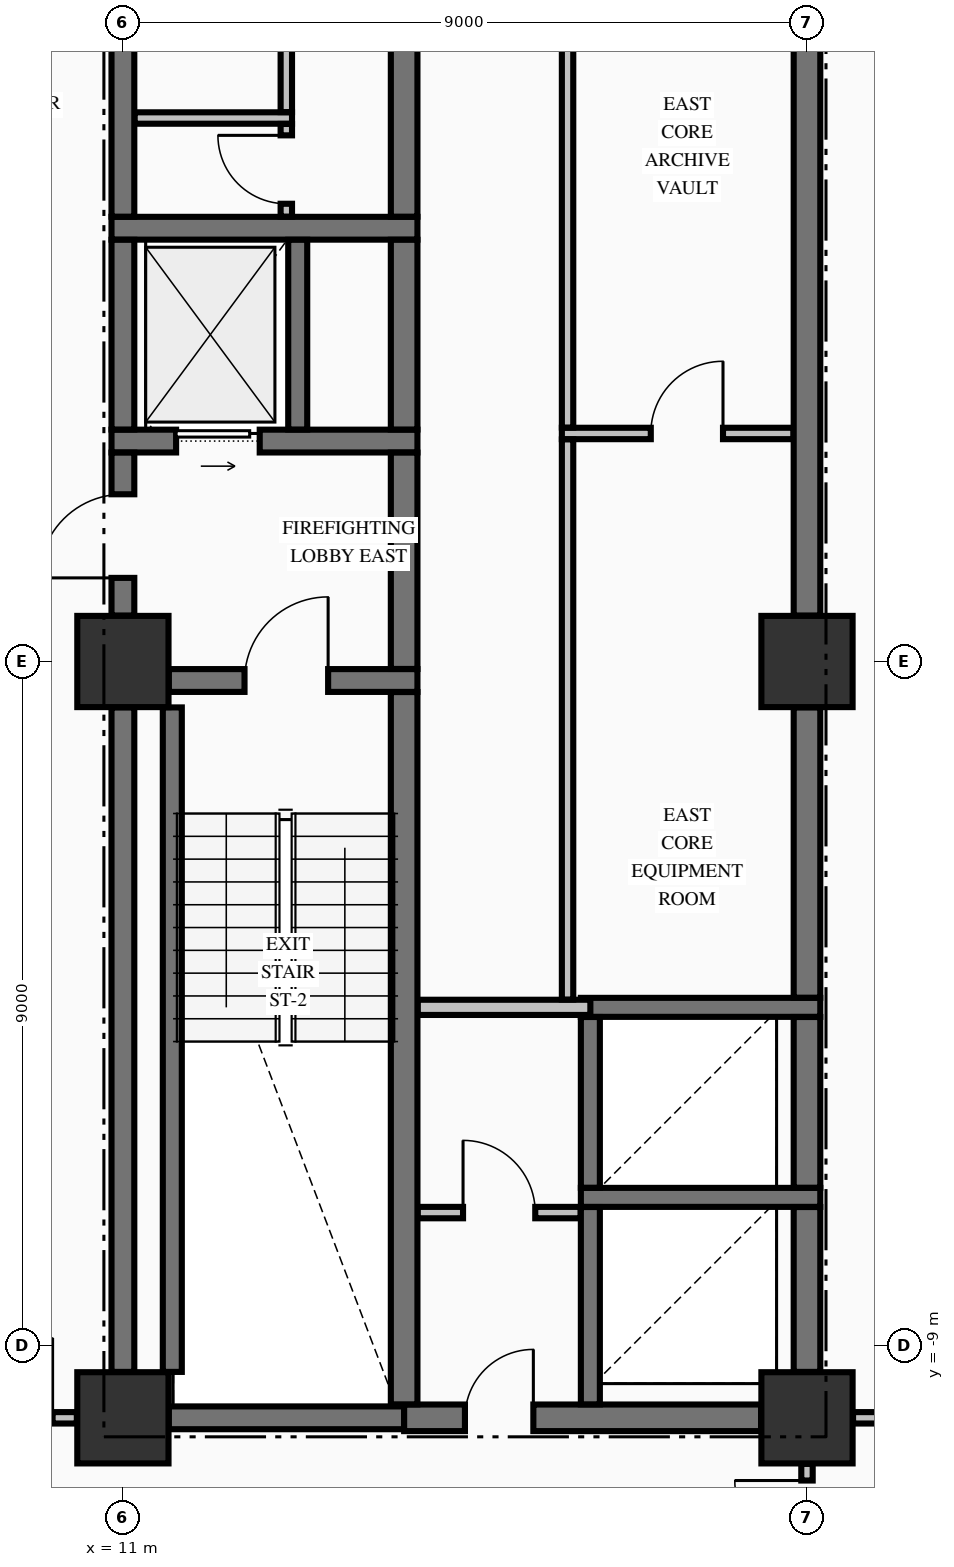
"""IFC4 building model, lengths in metres.
Left out: names, types, materials, properties, quantities, classifications, styles, units other than length and angle.
Written with IfcOpenShell. Run it as: python <this file> out.ifc"""

import sys

from ifc_helpers import new_model, si_unit, direction, frame, frame_2d, origin, origin_2d, place, context, subcontext, project, spatial, rectangle, extrude, element, fill, save


model = new_model("IFC4")
c1 = context("Model", 3, precision=1e-05, world=origin(), true_north=direction((0.0, 1.0)))
c2 = subcontext(c1, "Body", "Model", "MODEL_VIEW")
j1 = project(units=[si_unit("LENGTHUNIT", "METRE"), si_unit("PLANEANGLEUNIT", "RADIAN")], contexts=[c1])
p1 = place(None, origin())
s1 = spatial("IfcSite", under=j1, at=p1, CompositionType="ELEMENT")
p2 = place(p1, origin())
s2 = spatial("IfcBuilding", under=s1, at=p2, CompositionType="ELEMENT")
p3 = place(p2, frame((0.0, 0.0, 71.47)))
s3 = spatial("IfcBuildingStorey", under=s2, at=p3, CompositionType="ELEMENT", Elevation=71.47)
for number, where, z_axis, x_axis in (
    (1, (11.0, -9.95, -0.325), (0.0, 0.0, 1.0), (1.0, 0.0, 0.0)),
    (2, (11.0, 0.0, -0.325), (0.0, 0.0, 1.0), (1.0, 0.0, 0.0)),
    (3, (20.0, -9.95, -0.325), (0.0, 0.0, 1.0), (1.0, 0.0, 0.0)),
    (4, (20.0, 0.0, -0.325), (0.0, 0.0, 1.0), (1.0, 0.0, 0.0)),
):
    element("IfcColumn", number, at=place(p3, frame(where, z_axis=z_axis, x_axis=x_axis)), inside=s3, PredefinedType="COLUMN", context=c2, shape_type="SweptSolid", body=[
        extrude(rectangle(XDim=1.2, YDim=1.2, at=origin_2d()), origin(), (0.0, 0.0, 1.0), 3.645),
    ])
p4 = place(p3, frame((11.604, -9.95, 0.0), z_axis=(0.0, 0.0, 1.0), x_axis=(1.0, 0.0, 0.0)))
e5 = element("IfcWall", 5, at=p4, inside=s3, PredefinedType="SHEAR", context=c2, shape_type="SweptSolid", body=[
    extrude(rectangle(XDim=3.096, YDim=0.3, at=frame_2d((1.548, 0.0))), origin(), (0.0, 0.0, 1.0), 3.32),
])
p5 = place(p3, frame((14.7, -9.95, 0.0), z_axis=(0.0, 0.0, 1.0), x_axis=(1.0, 0.0, 0.0)))
e6 = element("IfcWall", 6, at=p5, inside=s3, PredefinedType="SHEAR", context=c2, shape_type="SweptSolid", body=[
    extrude(rectangle(XDim=4.696, YDim=0.35, at=frame_2d((2.348, 0.0))), origin(), (0.0, 0.0, 1.0), 3.32),
])
p6 = place(p5, frame((0.8, 0.0, 0.0)))
e7 = element("IfcOpeningElement", 7, at=p6, cuts=e6, PredefinedType="OPENING", context=c2, shape_type="SweptSolid", body=[
    extrude(rectangle(XDim=0.9, YDim=2.15, at=frame_2d((0.45, 1.075))), frame((0.0, 0.185, 0.0), z_axis=(0.0, -1.0, 0.0), x_axis=(1.0, 0.0, 0.0)), (0.0, 0.0, 1.0), 0.37),
])
for number, where, z_axis, x_axis in (
    (8, (17.025, -7.05, 0.0), (0.0, 0.0, 1.0), (1.0, 0.0, 0.0)),
    (9, (17.025, -4.55, 0.0), (0.0, 0.0, 1.0), (1.0, 0.0, 0.0)),
):
    element("IfcWall", number, at=place(p3, frame(where, z_axis=z_axis, x_axis=x_axis)), inside=s3, PredefinedType="SOLIDWALL", context=c2, shape_type="SweptSolid", body=[
        extrude(rectangle(XDim=3.15, YDim=0.25, at=frame_2d((1.575, 0.0))), origin(), (0.0, 0.0, 1.0), 3.32),
    ])
p7 = place(p3, frame((11.604, -0.25, 0.0), z_axis=(0.0, 0.0, 1.0), x_axis=(1.0, 0.0, 0.0)))
e10 = element("IfcWall", 10, at=p7, inside=s3, PredefinedType="SHEAR", context=c2, shape_type="SweptSolid", body=[
    extrude(rectangle(XDim=3.271, YDim=0.3, at=frame_2d((1.635, 0.0))), origin(), (0.0, 0.0, 1.0), 3.32),
])
p8 = place(p7, frame((0.996, 0.0, 0.0)))
e11 = element("IfcOpeningElement", 11, at=p8, cuts=e10, PredefinedType="OPENING", context=c2, shape_type="SweptSolid", body=[
    extrude(rectangle(XDim=1.1, YDim=2.15, at=frame_2d((0.55, 1.075))), frame((0.0, 0.16, 0.0), z_axis=(0.0, -1.0, 0.0), x_axis=(1.0, 0.0, 0.0)), (0.0, 0.0, 1.0), 0.32),
])
p9 = place(p3, frame((10.85, 2.9, 0.0), z_axis=(0.0, 0.0, 1.0), x_axis=(1.0, 0.0, 0.0)))
e12 = element("IfcWall", 12, at=p9, inside=s3, PredefinedType="SHEAR", context=c2, shape_type="SweptSolid", body=[
    extrude(rectangle(XDim=4.025, YDim=0.3, at=frame_2d((2.012, 0.0))), origin(), (0.0, 0.0, 1.0), 3.32),
])
p10 = place(p9, frame((0.85, 0.0, 0.0)))
e13 = element("IfcOpeningElement", 13, at=p10, cuts=e12, PredefinedType="OPENING", context=c2, shape_type="SweptSolid", body=[
    extrude(rectangle(XDim=1.1, YDim=2.2, at=frame_2d((0.55, 1.1))), frame((0.0, 0.16, 0.0), z_axis=(0.0, -1.0, 0.0), x_axis=(1.0, 0.0, 0.0)), (0.0, 0.0, 1.0), 0.32),
])
p11 = place(p3, frame((10.85, 5.7, 0.0), z_axis=(0.0, 0.0, 1.0), x_axis=(1.0, 0.0, 0.0)))
e14 = element("IfcWall", 14, at=p11, inside=s3, PredefinedType="SHEAR", context=c2, shape_type="SweptSolid", body=[
    extrude(rectangle(XDim=4.025, YDim=0.3, at=frame_2d((2.012, 0.0))), origin(), (0.0, 0.0, 1.0), 3.32),
])
p12 = place(p3, frame((-10.394, -9.95, 0.0), z_axis=(0.0, 0.0, 1.0), x_axis=(1.0, 0.0, 0.0)))
e15 = element("IfcWall", 15, at=p12, inside=s3, PredefinedType="PARTITIONING", context=c2, shape_type="SweptSolid", body=[
    extrude(rectangle(XDim=20.788, YDim=0.15, at=frame_2d((10.394, 0.0))), origin(), (0.0, 0.0, 1.0), 3.32),
])
p13 = place(p12, frame((0.319, 0.0, 0.0)))
e16 = element("IfcOpeningElement", 16, at=p13, cuts=e15, PredefinedType="OPENING", context=c2, shape_type="SweptSolid", body=[
    extrude(rectangle(XDim=1.05, YDim=2.15, at=frame_2d((0.525, 1.075))), frame((0.0, 0.085, 0.0), z_axis=(0.0, -1.0, 0.0), x_axis=(1.0, 0.0, 0.0)), (0.0, 0.0, 1.0), 0.17),
])
p14 = place(p12, frame((19.419, 0.0, 0.0)))
e17 = element("IfcOpeningElement", 17, at=p14, cuts=e15, PredefinedType="OPENING", context=c2, shape_type="SweptSolid", body=[
    extrude(rectangle(XDim=1.05, YDim=2.15, at=frame_2d((0.525, 1.075))), frame((0.0, 0.085, 0.0), z_axis=(0.0, -1.0, 0.0), x_axis=(1.0, 0.0, 0.0)), (0.0, 0.0, 1.0), 0.17),
])
p15 = place(p12, frame((11.569, 0.0, 0.0)))
e18 = element("IfcOpeningElement", 18, at=p15, cuts=e15, PredefinedType="OPENING", context=c2, shape_type="SweptSolid", body=[
    extrude(rectangle(XDim=0.95, YDim=2.15, at=frame_2d((0.475, 1.075))), frame((0.0, 0.085, 0.0), z_axis=(0.0, -1.0, 0.0), x_axis=(1.0, 0.0, 0.0)), (0.0, 0.0, 1.0), 0.17),
])
p16 = place(p3, frame((20.606, -9.95, 0.0), z_axis=(0.0, 0.0, 1.0), x_axis=(1.0, 0.0, 0.0)))
e19 = element("IfcWall", 19, at=p16, inside=s3, PredefinedType="PARTITIONING", context=c2, shape_type="SweptSolid", body=[
    extrude(rectangle(XDim=3.229, YDim=0.15, at=frame_2d((1.615, 0.0))), origin(), (0.0, 0.0, 1.0), 3.32),
])
p17 = place(p16, frame((0.894, 0.0, 0.0)))
e20 = element("IfcOpeningElement", 20, at=p17, cuts=e19, PredefinedType="OPENING", context=c2, shape_type="SweptSolid", body=[
    extrude(rectangle(XDim=1.0, YDim=2.15, at=frame_2d((0.5, 1.075))), frame((0.0, 0.085, 0.0), z_axis=(0.0, -1.0, 0.0), x_axis=(1.0, 0.0, 0.0)), (0.0, 0.0, 1.0), 0.17),
])
p18 = place(p3, frame((14.878, -7.25, 0.0), z_axis=(0.0, 0.0, 1.0), x_axis=(1.0, 0.0, 0.0)))
e21 = element("IfcWall", 21, at=p18, inside=s3, PredefinedType="PARTITIONING", context=c2, shape_type="SweptSolid", body=[
    extrude(rectangle(XDim=2.144, YDim=0.15, at=frame_2d((1.072, 0.0))), origin(), (0.0, 0.0, 1.0), 3.32),
])
p19 = place(p18, frame((0.597, 0.0, 0.0)))
e22 = element("IfcOpeningElement", 22, at=p19, cuts=e21, PredefinedType="OPENING", context=c2, shape_type="SweptSolid", body=[
    extrude(rectangle(XDim=0.95, YDim=2.15, at=frame_2d((0.475, 1.075))), frame((0.0, 0.085, 0.0), z_axis=(0.0, -1.0, 0.0), x_axis=(1.0, 0.0, 0.0)), (0.0, 0.0, 1.0), 0.17),
])
p20 = place(p3, frame((14.878, -4.55, 0.0), z_axis=(0.0, 0.0, 1.0), x_axis=(1.0, 0.0, 0.0)))
e23 = element("IfcWall", 23, at=p20, inside=s3, PredefinedType="PARTITIONING", context=c2, shape_type="SweptSolid", body=[
    extrude(rectangle(XDim=2.272, YDim=0.2, at=frame_2d((1.136, 0.0))), origin(), (0.0, 0.0, 1.0), 3.32),
])
p21 = place(p3, frame((16.775, 3.0, 0.0), z_axis=(0.0, 0.0, 1.0), x_axis=(1.0, 0.0, 0.0)))
e24 = element("IfcWall", 24, at=p21, inside=s3, PredefinedType="PARTITIONING", context=c2, shape_type="SweptSolid", body=[
    extrude(rectangle(XDim=3.047, YDim=0.15, at=frame_2d((1.523, 0.0))), origin(), (0.0, 0.0, 1.0), 3.32),
])
p22 = place(p21, frame((1.17, 0.0, 0.0)))
e25 = element("IfcOpeningElement", 25, at=p22, cuts=e24, PredefinedType="OPENING", context=c2, shape_type="SweptSolid", body=[
    extrude(rectangle(XDim=0.95, YDim=2.15, at=frame_2d((0.475, 1.075))), frame((0.0, 0.085, 0.0), z_axis=(0.0, -1.0, 0.0), x_axis=(1.0, 0.0, 0.0)), (0.0, 0.0, 1.0), 0.17),
])
p23 = place(p3, frame((11.153, 7.15, 0.0), z_axis=(0.0, 0.0, 1.0), x_axis=(1.0, 0.0, 0.0)))
e26 = element("IfcWall", 26, at=p23, inside=s3, PredefinedType="PARTITIONING", context=c2, shape_type="SweptSolid", body=[
    extrude(rectangle(XDim=2.072, YDim=0.15, at=frame_2d((1.036, 0.0))), origin(), (0.0, 0.0, 1.0), 3.32),
])
p24 = place(p3, frame((11.0, -9.346, 0.0), z_axis=(0.0, 0.0, 1.0), x_axis=(0.0, 1.0, 0.0)))
e27 = element("IfcWall", 27, at=p24, inside=s3, PredefinedType="SHEAR", context=c2, shape_type="SweptSolid", body=[
    extrude(rectangle(XDim=8.742, YDim=0.3, at=frame_2d((4.371, 0.0))), origin(), (0.0, 0.0, 1.0), 3.32),
])
p25 = place(p3, frame((11.0, 0.604, 0.0), z_axis=(0.0, 0.0, 1.0), x_axis=(0.0, 1.0, 0.0)))
e28 = element("IfcWall", 28, at=p25, inside=s3, PredefinedType="SHEAR", context=c2, shape_type="SweptSolid", body=[
    extrude(rectangle(XDim=2.144, YDim=0.3, at=frame_2d((1.072, 0.0))), origin(), (0.0, 0.0, 1.0), 3.32),
])
p26 = place(p25, frame((0.496, 0.0, 0.0)))
e29 = element("IfcOpeningElement", 29, at=p26, cuts=e28, PredefinedType="OPENING", context=c2, shape_type="SweptSolid", body=[
    extrude(rectangle(XDim=1.1, YDim=2.15, at=frame_2d((0.55, 1.075))), frame((0.0, 0.16, 0.0), z_axis=(0.0, -1.0, 0.0), x_axis=(1.0, 0.0, 0.0)), (0.0, 0.0, 1.0), 0.32),
])
p27 = place(p3, frame((11.0, 3.052, 0.0), z_axis=(0.0, 0.0, 1.0), x_axis=(0.0, 1.0, 0.0)))
e30 = element("IfcWall", 30, at=p27, inside=s3, PredefinedType="SHEAR", context=c2, shape_type="SweptSolid", body=[
    extrude(rectangle(XDim=2.496, YDim=0.3, at=frame_2d((1.248, 0.0))), origin(), (0.0, 0.0, 1.0), 3.32),
])
p28 = place(p3, frame((11.0, 5.852, 0.0), z_axis=(0.0, 0.0, 1.0), x_axis=(0.0, 1.0, 0.0)))
e31 = element("IfcWall", 31, at=p28, inside=s3, PredefinedType="SHEAR", context=c2, shape_type="SweptSolid", body=[
    extrude(rectangle(XDim=4.044, YDim=0.3, at=frame_2d((2.022, 0.0))), origin(), (0.0, 0.0, 1.0), 3.32),
])
p29 = place(p3, frame((11.65, -9.346, 0.0), z_axis=(0.0, 0.0, 1.0), x_axis=(0.0, 1.0, 0.0)))
e32 = element("IfcWall", 32, at=p29, inside=s3, PredefinedType="SOLIDWALL", context=c2, shape_type="SweptSolid", body=[
    extrude(rectangle(XDim=8.742, YDim=0.25, at=frame_2d((4.371, 0.0))), origin(), (0.0, 0.0, 1.0), 3.32),
])
p30 = place(p3, frame((13.3, 3.052, 0.0), z_axis=(0.0, 0.0, 1.0), x_axis=(0.0, 1.0, 0.0)))
e33 = element("IfcWall", 33, at=p30, inside=s3, PredefinedType="SOLIDWALL", context=c2, shape_type="SweptSolid", body=[
    extrude(rectangle(XDim=2.496, YDim=0.25, at=frame_2d((1.248, 0.0))), origin(), (0.0, 0.0, 1.0), 3.32),
])
p31 = place(p3, frame((14.7, -9.773, 0.0), z_axis=(0.0, 0.0, 1.0), x_axis=(0.0, 1.0, 0.0)))
e34 = element("IfcWall", 34, at=p31, inside=s3, PredefinedType="SHEAR", context=c2, shape_type="SweptSolid", body=[
    extrude(rectangle(XDim=9.371, YDim=0.35, at=frame_2d((4.686, 0.0))), origin(), (0.0, 0.0, 1.0), 3.32),
])
p32 = place(p3, frame((14.7, -0.098, 0.0), z_axis=(0.0, 0.0, 1.0), x_axis=(0.0, 1.0, 0.0)))
e35 = element("IfcWall", 35, at=p32, inside=s3, PredefinedType="SHEAR", context=c2, shape_type="SweptSolid", body=[
    extrude(rectangle(XDim=2.846, YDim=0.35, at=frame_2d((1.423, 0.0))), origin(), (0.0, 0.0, 1.0), 3.32),
])
p33 = place(p3, frame((14.7, 3.052, 0.0), z_axis=(0.0, 0.0, 1.0), x_axis=(0.0, 1.0, 0.0)))
e36 = element("IfcWall", 36, at=p33, inside=s3, PredefinedType="SHEAR", context=c2, shape_type="SweptSolid", body=[
    extrude(rectangle(XDim=2.496, YDim=0.35, at=frame_2d((1.248, 0.0))), origin(), (0.0, 0.0, 1.0), 3.32),
])
p34 = place(p3, frame((14.7, 5.852, 0.0), z_axis=(0.0, 0.0, 1.0), x_axis=(0.0, 1.0, 0.0)))
e37 = element("IfcWall", 37, at=p34, inside=s3, PredefinedType="SHEAR", context=c2, shape_type="SweptSolid", body=[
    extrude(rectangle(XDim=4.471, YDim=0.35, at=frame_2d((2.235, 0.0))), origin(), (0.0, 0.0, 1.0), 3.32),
])
p35 = place(p3, frame((17.15, -9.773, 0.0), z_axis=(0.0, 0.0, 1.0), x_axis=(0.0, 1.0, 0.0)))
e38 = element("IfcWall", 38, at=p35, inside=s3, PredefinedType="SOLIDWALL", context=c2, shape_type="SweptSolid", body=[
    extrude(rectangle(XDim=2.596, YDim=0.25, at=frame_2d((1.298, 0.0))), origin(), (0.0, 0.0, 1.0), 3.32),
])
p36 = place(p3, frame((17.15, -6.923, 0.0), z_axis=(0.0, 0.0, 1.0), x_axis=(0.0, 1.0, 0.0)))
e39 = element("IfcWall", 39, at=p36, inside=s3, PredefinedType="SOLIDWALL", context=c2, shape_type="SweptSolid", body=[
    extrude(rectangle(XDim=2.246, YDim=0.25, at=frame_2d((1.123, 0.0))), origin(), (0.0, 0.0, 1.0), 3.32),
])
p37 = place(p3, frame((20.0, -9.346, 0.0), z_axis=(0.0, 0.0, 1.0), x_axis=(0.0, 1.0, 0.0)))
e40 = element("IfcWall", 40, at=p37, inside=s3, PredefinedType="SHEAR", context=c2, shape_type="SweptSolid", body=[
    extrude(rectangle(XDim=2.169, YDim=0.35, at=frame_2d((1.084, 0.0))), origin(), (0.0, 0.0, 1.0), 3.32),
])
p38 = place(p3, frame((20.0, -6.923, 0.0), z_axis=(0.0, 0.0, 1.0), x_axis=(0.0, 1.0, 0.0)))
e41 = element("IfcWall", 41, at=p38, inside=s3, PredefinedType="SHEAR", context=c2, shape_type="SweptSolid", body=[
    extrude(rectangle(XDim=2.246, YDim=0.35, at=frame_2d((1.123, 0.0))), origin(), (0.0, 0.0, 1.0), 3.32),
])
p39 = place(p3, frame((20.0, -4.423, 0.0), z_axis=(0.0, 0.0, 1.0), x_axis=(0.0, 1.0, 0.0)))
e42 = element("IfcWall", 42, at=p39, inside=s3, PredefinedType="SHEAR", context=c2, shape_type="SweptSolid", body=[
    extrude(rectangle(XDim=3.819, YDim=0.35, at=frame_2d((1.91, 0.0))), origin(), (0.0, 0.0, 1.0), 3.32),
])
p40 = place(p3, frame((20.0, 0.604, 0.0), z_axis=(0.0, 0.0, 1.0), x_axis=(0.0, 1.0, 0.0)))
e43 = element("IfcWall", 43, at=p40, inside=s3, PredefinedType="SHEAR", context=c2, shape_type="SweptSolid", body=[
    extrude(rectangle(XDim=9.292, YDim=0.35, at=frame_2d((4.646, 0.0))), origin(), (0.0, 0.0, 1.0), 3.32),
])
p41 = place(p3, frame((13.15, 5.853, 0.0), z_axis=(0.0, 0.0, 1.0), x_axis=(0.0, 1.0, 0.0)))
e44 = element("IfcWall", 44, at=p41, inside=s3, PredefinedType="PARTITIONING", context=c2, shape_type="SweptSolid", body=[
    extrude(rectangle(XDim=1.219, YDim=0.15, at=frame_2d((0.609, 0.0))), origin(), (0.0, 0.0, 1.0), 3.32),
])
p42 = place(p41, frame((0.169, 0.0, 0.0)))
e45 = element("IfcOpeningElement", 45, at=p42, cuts=e44, PredefinedType="OPENING", context=c2, shape_type="SweptSolid", body=[
    extrude(rectangle(XDim=0.9, YDim=2.15, at=frame_2d((0.45, 1.075))), frame((0.0, 0.085, 0.0), z_axis=(0.0, -1.0, 0.0), x_axis=(1.0, 0.0, 0.0)), (0.0, 0.0, 1.0), 0.17),
])
p43 = place(p3, frame((13.15, 7.228, 0.0), z_axis=(0.0, 0.0, 1.0), x_axis=(0.0, 1.0, 0.0)))
e46 = element("IfcWall", 46, at=p43, inside=s3, PredefinedType="PARTITIONING", context=c2, shape_type="SweptSolid", body=[
    extrude(rectangle(XDim=3.119, YDim=0.15, at=frame_2d((1.56, 0.0))), origin(), (0.0, 0.0, 1.0), 3.32),
])
p44 = place(p43, frame((1.097, 0.0, 0.0)))
e47 = element("IfcOpeningElement", 47, at=p44, cuts=e46, PredefinedType="OPENING", context=c2, shape_type="SweptSolid", body=[
    extrude(rectangle(XDim=0.95, YDim=2.15, at=frame_2d((0.475, 1.075))), frame((0.0, 0.085, 0.0), z_axis=(0.0, -1.0, 0.0), x_axis=(1.0, 0.0, 0.0)), (0.0, 0.0, 1.0), 0.17),
])
p45 = place(p3, frame((16.85, -4.447, 0.0), z_axis=(0.0, 0.0, 1.0), x_axis=(0.0, 1.0, 0.0)))
e48 = element("IfcWall", 48, at=p45, inside=s3, PredefinedType="PARTITIONING", context=c2, shape_type="SweptSolid", body=[
    extrude(rectangle(XDim=7.369, YDim=0.15, at=frame_2d((3.685, 0.0))), origin(), (0.0, 0.0, 1.0), 3.32),
])
p46 = place(p3, frame((16.85, 3.078, 0.0), z_axis=(0.0, 0.0, 1.0), x_axis=(0.0, 1.0, 0.0)))
e49 = element("IfcWall", 49, at=p46, inside=s3, PredefinedType="PARTITIONING", context=c2, shape_type="SweptSolid", body=[
    extrude(rectangle(XDim=7.244, YDim=0.15, at=frame_2d((3.622, 0.0))), origin(), (0.0, 0.0, 1.0), 3.32),
])
p47 = place(p3, frame((20.0, -12.472, 0.0), z_axis=(0.0, 0.0, 1.0), x_axis=(0.0, 1.0, 0.0)))
e50 = element("IfcWall", 50, at=p47, inside=s3, PredefinedType="PARTITIONING", context=c2, shape_type="SweptSolid", body=[
    extrude(rectangle(XDim=1.916, YDim=0.15, at=frame_2d((0.958, 0.0))), origin(), (0.0, 0.0, 1.0), 3.32),
])
p48 = place(p47, frame((0.747, 0.0, 0.0)))
e51 = element("IfcOpeningElement", 51, at=p48, cuts=e50, PredefinedType="OPENING", context=c2, shape_type="SweptSolid", body=[
    extrude(rectangle(XDim=0.95, YDim=2.15, at=frame_2d((0.475, 1.075))), frame((0.0, 0.085, 0.0), z_axis=(0.0, -1.0, 0.0), x_axis=(1.0, 0.0, 0.0)), (0.0, 0.0, 1.0), 0.17),
])
p49 = place(p8, origin())
e52 = element("IfcDoor", 52, at=p49, inside=s3, OperationType="SINGLE_SWING_RIGHT", PredefinedType="DOOR", context=c2, shape_type="SweptSolid", body=[
    extrude(rectangle(XDim=1.1, YDim=2.15, at=frame_2d((0.55, 1.075))), frame((0.0, 0.025, 0.0), z_axis=(0.0, -1.0, 0.0), x_axis=(1.0, 0.0, 0.0)), (0.0, 0.0, 1.0), 0.05),
])
fill(e11, e52)
p50 = place(p26, origin())
e53 = element("IfcDoor", 53, at=p50, inside=s3, OperationType="SINGLE_SWING_LEFT", PredefinedType="DOOR", context=c2, shape_type="SweptSolid", body=[
    extrude(rectangle(XDim=1.1, YDim=2.15, at=frame_2d((0.55, 1.075))), frame((0.0, 0.025, 0.0), z_axis=(0.0, -1.0, 0.0), x_axis=(1.0, 0.0, 0.0)), (0.0, 0.0, 1.0), 0.05),
])
fill(e29, e53)
p51 = place(p10, origin())
e54 = element("IfcDoor", 54, at=p51, inside=s3, OperationType="SLIDING_TO_RIGHT", PredefinedType="DOOR", context=c2, shape_type="SweptSolid", body=[
    extrude(rectangle(XDim=1.1, YDim=2.2, at=frame_2d((0.55, 1.1))), frame((0.0, 0.025, 0.0), z_axis=(0.0, -1.0, 0.0), x_axis=(1.0, 0.0, 0.0)), (0.0, 0.0, 1.0), 0.05),
])
fill(e13, e54)
p52 = place(p42, origin())
e55 = element("IfcDoor", 55, at=p52, inside=s3, OperationType="SINGLE_SWING_RIGHT", PredefinedType="DOOR", context=c2, shape_type="SweptSolid", body=[
    extrude(rectangle(XDim=0.9, YDim=2.15, at=frame_2d((0.45, 1.075))), frame((0.0, 0.025, 0.0), z_axis=(0.0, -1.0, 0.0), x_axis=(1.0, 0.0, 0.0)), (0.0, 0.0, 1.0), 0.05),
])
fill(e45, e55)
p53 = place(p6, origin())
e56 = element("IfcDoor", 56, at=p53, inside=s3, OperationType="SINGLE_SWING_RIGHT", PredefinedType="DOOR", context=c2, shape_type="SweptSolid", body=[
    extrude(rectangle(XDim=0.9, YDim=2.15, at=frame_2d((0.45, 1.075))), frame((0.0, 0.025, 0.0), z_axis=(0.0, -1.0, 0.0), x_axis=(1.0, 0.0, 0.0)), (0.0, 0.0, 1.0), 0.05),
])
fill(e7, e56)
p54 = place(p19, origin())
e57 = element("IfcDoor", 57, at=p54, inside=s3, OperationType="SINGLE_SWING_LEFT", PredefinedType="DOOR", context=c2, shape_type="SweptSolid", body=[
    extrude(rectangle(XDim=0.95, YDim=2.15, at=frame_2d((0.475, 1.075))), frame((0.0, 0.025, 0.0), z_axis=(0.0, -1.0, 0.0), x_axis=(1.0, 0.0, 0.0)), (0.0, 0.0, 1.0), 0.05),
])
fill(e22, e57)
p55 = place(p22, origin())
e58 = element("IfcDoor", 58, at=p55, inside=s3, OperationType="SINGLE_SWING_RIGHT", PredefinedType="DOOR", context=c2, shape_type="SweptSolid", body=[
    extrude(rectangle(XDim=0.95, YDim=2.15, at=frame_2d((0.475, 1.075))), frame((0.0, 0.025, 0.0), z_axis=(0.0, -1.0, 0.0), x_axis=(1.0, 0.0, 0.0)), (0.0, 0.0, 1.0), 0.05),
])
fill(e25, e58)
p56 = place(p48, origin())
e59 = element("IfcDoor", 59, at=p56, inside=s3, OperationType="SINGLE_SWING_RIGHT", PredefinedType="DOOR", context=c2, shape_type="SweptSolid", body=[
    extrude(rectangle(XDim=0.95, YDim=2.15, at=frame_2d((0.475, 1.075))), frame((0.0, 0.025, 0.0), z_axis=(0.0, -1.0, 0.0), x_axis=(1.0, 0.0, 0.0)), (0.0, 0.0, 1.0), 0.05),
])
fill(e51, e59)
save(model, sys.argv[1])
